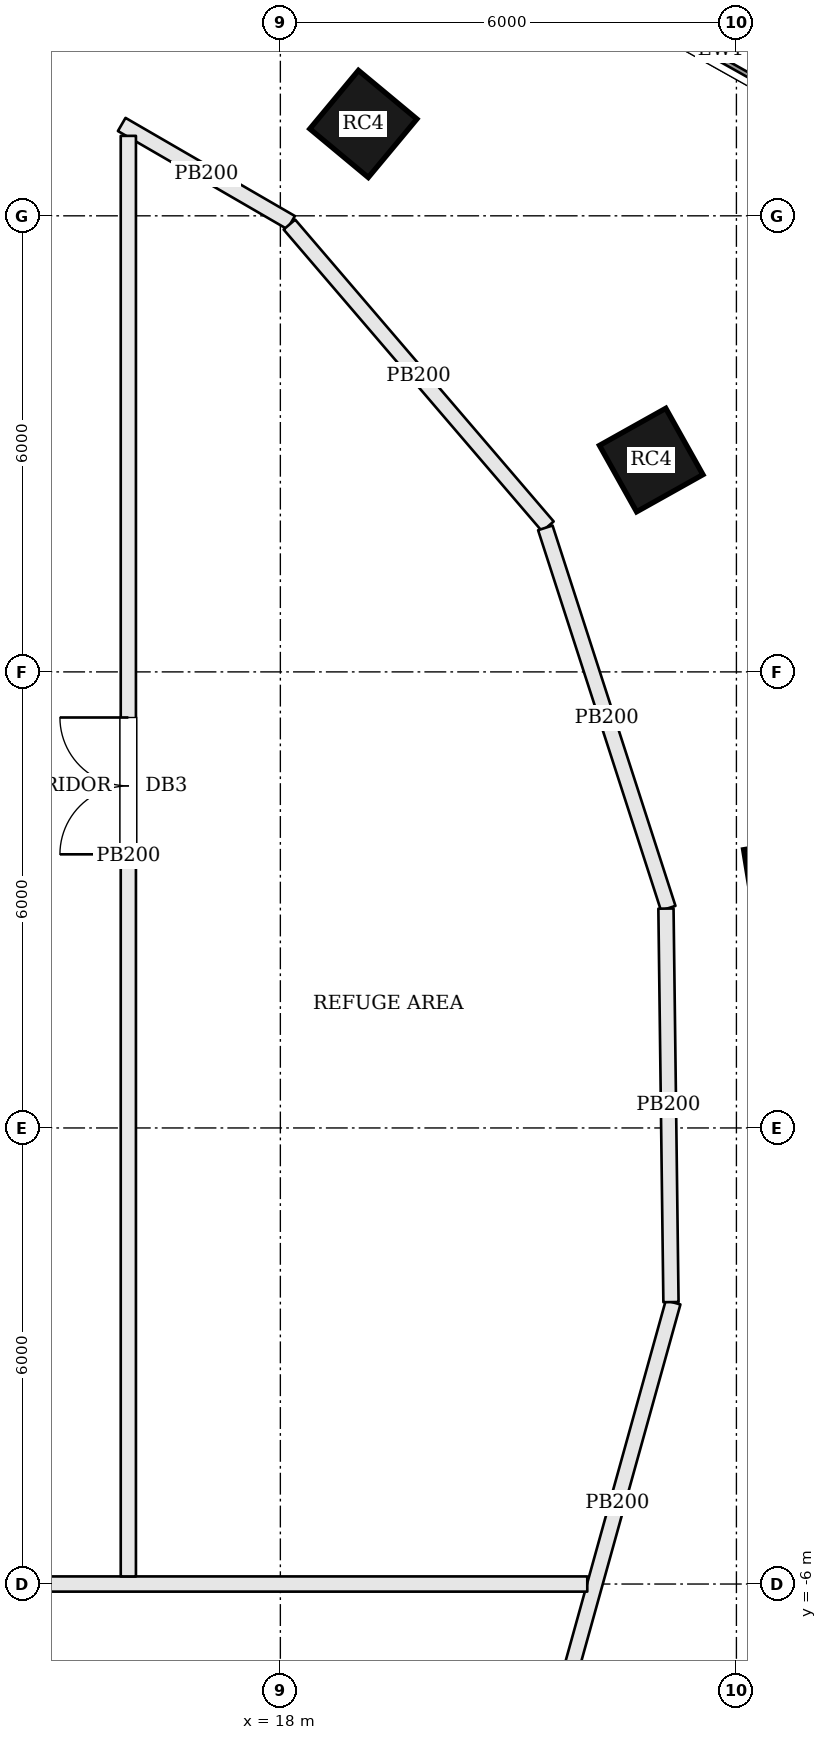
"""IFC4 building model, lengths in metres.
Left out: names, types, materials, properties, quantities, classifications, styles, units other than length and angle.
Written with IfcOpenShell. Run it as: python <this file> out.ifc"""

import sys

from ifc_helpers import new_model, si_unit, direction, frame, frame_2d, origin, origin_2d, place, context, subcontext, project, spatial, rectangle, extrude, element, fill, save


model = new_model("IFC4")
c1 = context("Model", 3, precision=1e-05, world=origin(), true_north=direction((0.0, 1.0)))
c2 = subcontext(c1, "Body", "Model", "MODEL_VIEW")
j1 = project(units=[si_unit("LENGTHUNIT", "METRE"), si_unit("PLANEANGLEUNIT", "RADIAN")], contexts=[c1])
p1 = place(None, origin())
s1 = spatial("IfcSite", under=j1, at=p1, CompositionType="ELEMENT")
p2 = place(p1, origin())
s2 = spatial("IfcBuilding", under=s1, at=p2, CompositionType="ELEMENT")
p3 = place(p2, frame((0.0, 0.0, 193.5)))
s3 = spatial("IfcBuildingStorey", under=s2, at=p3, CompositionType="ELEMENT", Elevation=193.5)
for number, where, z_axis, x_axis in (
    (1, (24.669, 3.248, 0.0), (0.0, 0.0, 1.0), (-0.162, 0.987, 0.0)),
    (2, (22.879, 8.787, 0.0), (0.0, 0.0, 1.0), (-0.489, 0.873, 0.0)),
    (3, (19.092, 13.209, 0.0), (0.0, 0.0, 1.0), (-0.769, 0.639, 0.0)),
):
    element("IfcColumn", number, at=place(p3, frame(where, z_axis=z_axis, x_axis=x_axis)), inside=s3, PredefinedType="COLUMN", context=c2, shape_type="SweptSolid", body=[
        extrude(rectangle(XDim=1.0, YDim=1.0, at=origin_2d()), origin(), (0.0, 0.0, 1.0), 3.9),
    ])
p4 = place(p3, frame((25.844, 13.028, 0.0), z_axis=(0.0, 0.0, 1.0), x_axis=(-0.872346398261, 0.488888291373, 0.0)))
e4 = element("IfcWall", 4, at=p4, inside=s3, PredefinedType="SOLIDWALL", context=c2, shape_type="SweptSolid", body=[
    extrude(rectangle(XDim=4.696, YDim=0.45, at=frame_2d((2.348, 0.0))), origin(), (0.0, 0.0, 1.0), 3.7),
])
p5 = place(p4, frame((1.448, 0.0, 0.9)))
e5 = element("IfcOpeningElement", 5, at=p5, cuts=e4, PredefinedType="OPENING", context=c2, shape_type="SweptSolid", body=[
    extrude(rectangle(XDim=1.8, YDim=2.3, at=frame_2d((0.9, 1.15))), frame((0.0, 0.235, 0.0), z_axis=(0.0, -1.0, 0.0), x_axis=(1.0, 0.0, 0.0)), (0.0, 0.0, 1.0), 0.47),
])
p6 = place(p3, frame((25.734, 13.176, 3.9), z_axis=(0.0, 0.0, 1.0), x_axis=(-0.872345142407, 0.488890532245, 0.0)))
e6 = element("IfcWall", 6, at=p6, inside=s3, PredefinedType="PARAPET", context=c2, shape_type="SweptSolid", body=[
    extrude(rectangle(XDim=4.763, YDim=0.3, at=frame_2d((2.381, 0.0))), origin(), (0.0, 0.0, 1.0), 1.1),
])
p7 = place(p3, frame((23.167, -2.295, 0.0), z_axis=(0.0, 0.0, 1.0), x_axis=(-0.267604764515, -0.963528769684, 0.0)))
e7 = element("IfcWall", 7, at=p7, inside=s3, PredefinedType="PARTITIONING", context=c2, shape_type="SweptSolid", body=[
    extrude(rectangle(XDim=5.475, YDim=0.2, at=frame_2d((2.737, 0.0))), origin(), (0.0, 0.0, 1.0), 3.7),
])
p8 = place(p3, frame((-21.998, -6.0, 0.0), z_axis=(0.0, 0.0, 1.0), x_axis=(1.0, 0.0, 0.0)))
e8 = element("IfcWall", 8, at=p8, inside=s3, PredefinedType="PARTITIONING", context=c2, shape_type="SweptSolid", body=[
    extrude(rectangle(XDim=44.036, YDim=0.2, at=frame_2d((22.018, 0.0))), origin(), (0.0, 0.0, 1.0), 3.7),
])
p9 = place(p8, frame((21.098, 0.0, 0.0)))
e9 = element("IfcOpeningElement", 9, at=p9, cuts=e8, PredefinedType="OPENING", context=c2, shape_type="SweptSolid", body=[
    extrude(rectangle(XDim=1.8, YDim=2.1, at=frame_2d((0.9, 1.05))), frame((0.0, 0.11, 0.0), z_axis=(0.0, -1.0, 0.0), x_axis=(1.0, 0.0, 0.0)), (0.0, 0.0, 1.0), 0.22),
])
p10 = place(p3, frame((15.913, 13.202, 0.0), z_axis=(0.0, 0.0, 1.0), x_axis=(0.86524014554, -0.501357647339, 0.0)))
e10 = element("IfcWall", 10, at=p10, inside=s3, PredefinedType="PARTITIONING", context=c2, shape_type="SweptSolid", body=[
    extrude(rectangle(XDim=2.575, YDim=0.2, at=frame_2d((1.288, 0.0))), origin(), (0.0, 0.0, 1.0), 3.7),
])
p11 = place(p3, frame((18.119, 11.885, 0.0), z_axis=(0.0, 0.0, 1.0), x_axis=(0.650510608515, -0.759497168006, 0.0)))
e11 = element("IfcWall", 11, at=p11, inside=s3, PredefinedType="PARTITIONING", context=c2, shape_type="SweptSolid", body=[
    extrude(rectangle(XDim=5.228, YDim=0.2, at=frame_2d((2.614, 0.0))), origin(), (0.0, 0.0, 1.0), 3.7),
])
p12 = place(p3, frame((21.486, 7.895, 0.0), z_axis=(0.0, 0.0, 1.0), x_axis=(0.307481575482, -0.951554034587, 0.0)))
e12 = element("IfcWall", 12, at=p12, inside=s3, PredefinedType="PARTITIONING", context=c2, shape_type="SweptSolid", body=[
    extrude(rectangle(XDim=5.259, YDim=0.2, at=frame_2d((2.629, 0.0))), origin(), (0.0, 0.0, 1.0), 3.7),
])
p13 = place(p3, frame((23.073, 2.886, 0.0), z_axis=(0.0, 0.0, 1.0), x_axis=(0.012731813994, -0.999918947171, 0.0)))
e13 = element("IfcWall", 13, at=p13, inside=s3, PredefinedType="PARTITIONING", context=c2, shape_type="SweptSolid", body=[
    extrude(rectangle(XDim=5.177, YDim=0.2, at=frame_2d((2.589, 0.0))), origin(), (0.0, 0.0, 1.0), 3.7),
])
p14 = place(p3, frame((16.0, -5.9, 0.0), z_axis=(0.0, 0.0, 1.0), x_axis=(0.0, 1.0, 0.0)))
e14 = element("IfcWall", 14, at=p14, inside=s3, PredefinedType="PARTITIONING", context=c2, shape_type="SweptSolid", body=[
    extrude(rectangle(XDim=18.952, YDim=0.2, at=frame_2d((9.476, 0.0))), origin(), (0.0, 0.0, 1.0), 3.7),
])
p15 = place(p14, frame((9.5, 0.0, 0.0)))
e15 = element("IfcOpeningElement", 15, at=p15, cuts=e14, PredefinedType="OPENING", context=c2, shape_type="SweptSolid", body=[
    extrude(rectangle(XDim=1.8, YDim=2.1, at=frame_2d((0.9, 1.05))), frame((0.0, 0.11, 0.0), z_axis=(0.0, -1.0, 0.0), x_axis=(1.0, 0.0, 0.0)), (0.0, 0.0, 1.0), 0.22),
])
p16 = place(p5, origin())
e16 = element("IfcWindow", 16, at=p16, inside=s3, PartitioningType="SINGLE_PANEL", PredefinedType="WINDOW", context=c2, shape_type="SweptSolid", body=[
    extrude(rectangle(XDim=1.8, YDim=2.3, at=frame_2d((0.9, 1.15))), frame((0.0, 0.135, 0.0), z_axis=(0.0, -1.0, 0.0), x_axis=(1.0, 0.0, 0.0)), (0.0, 0.0, 1.0), 0.06),
])
fill(e5, e16)
p17 = place(p15, origin())
e17 = element("IfcDoor", 17, at=p17, inside=s3, OperationType="DOUBLE_DOOR_SINGLE_SWING", PredefinedType="DOOR", context=c2, shape_type="SweptSolid", body=[
    extrude(rectangle(XDim=1.8, YDim=2.1, at=frame_2d((0.9, 1.05))), frame((0.0, 0.025, 0.0), z_axis=(0.0, -1.0, 0.0), x_axis=(1.0, 0.0, 0.0)), (0.0, 0.0, 1.0), 0.05),
])
fill(e15, e17)
save(model, sys.argv[1])
